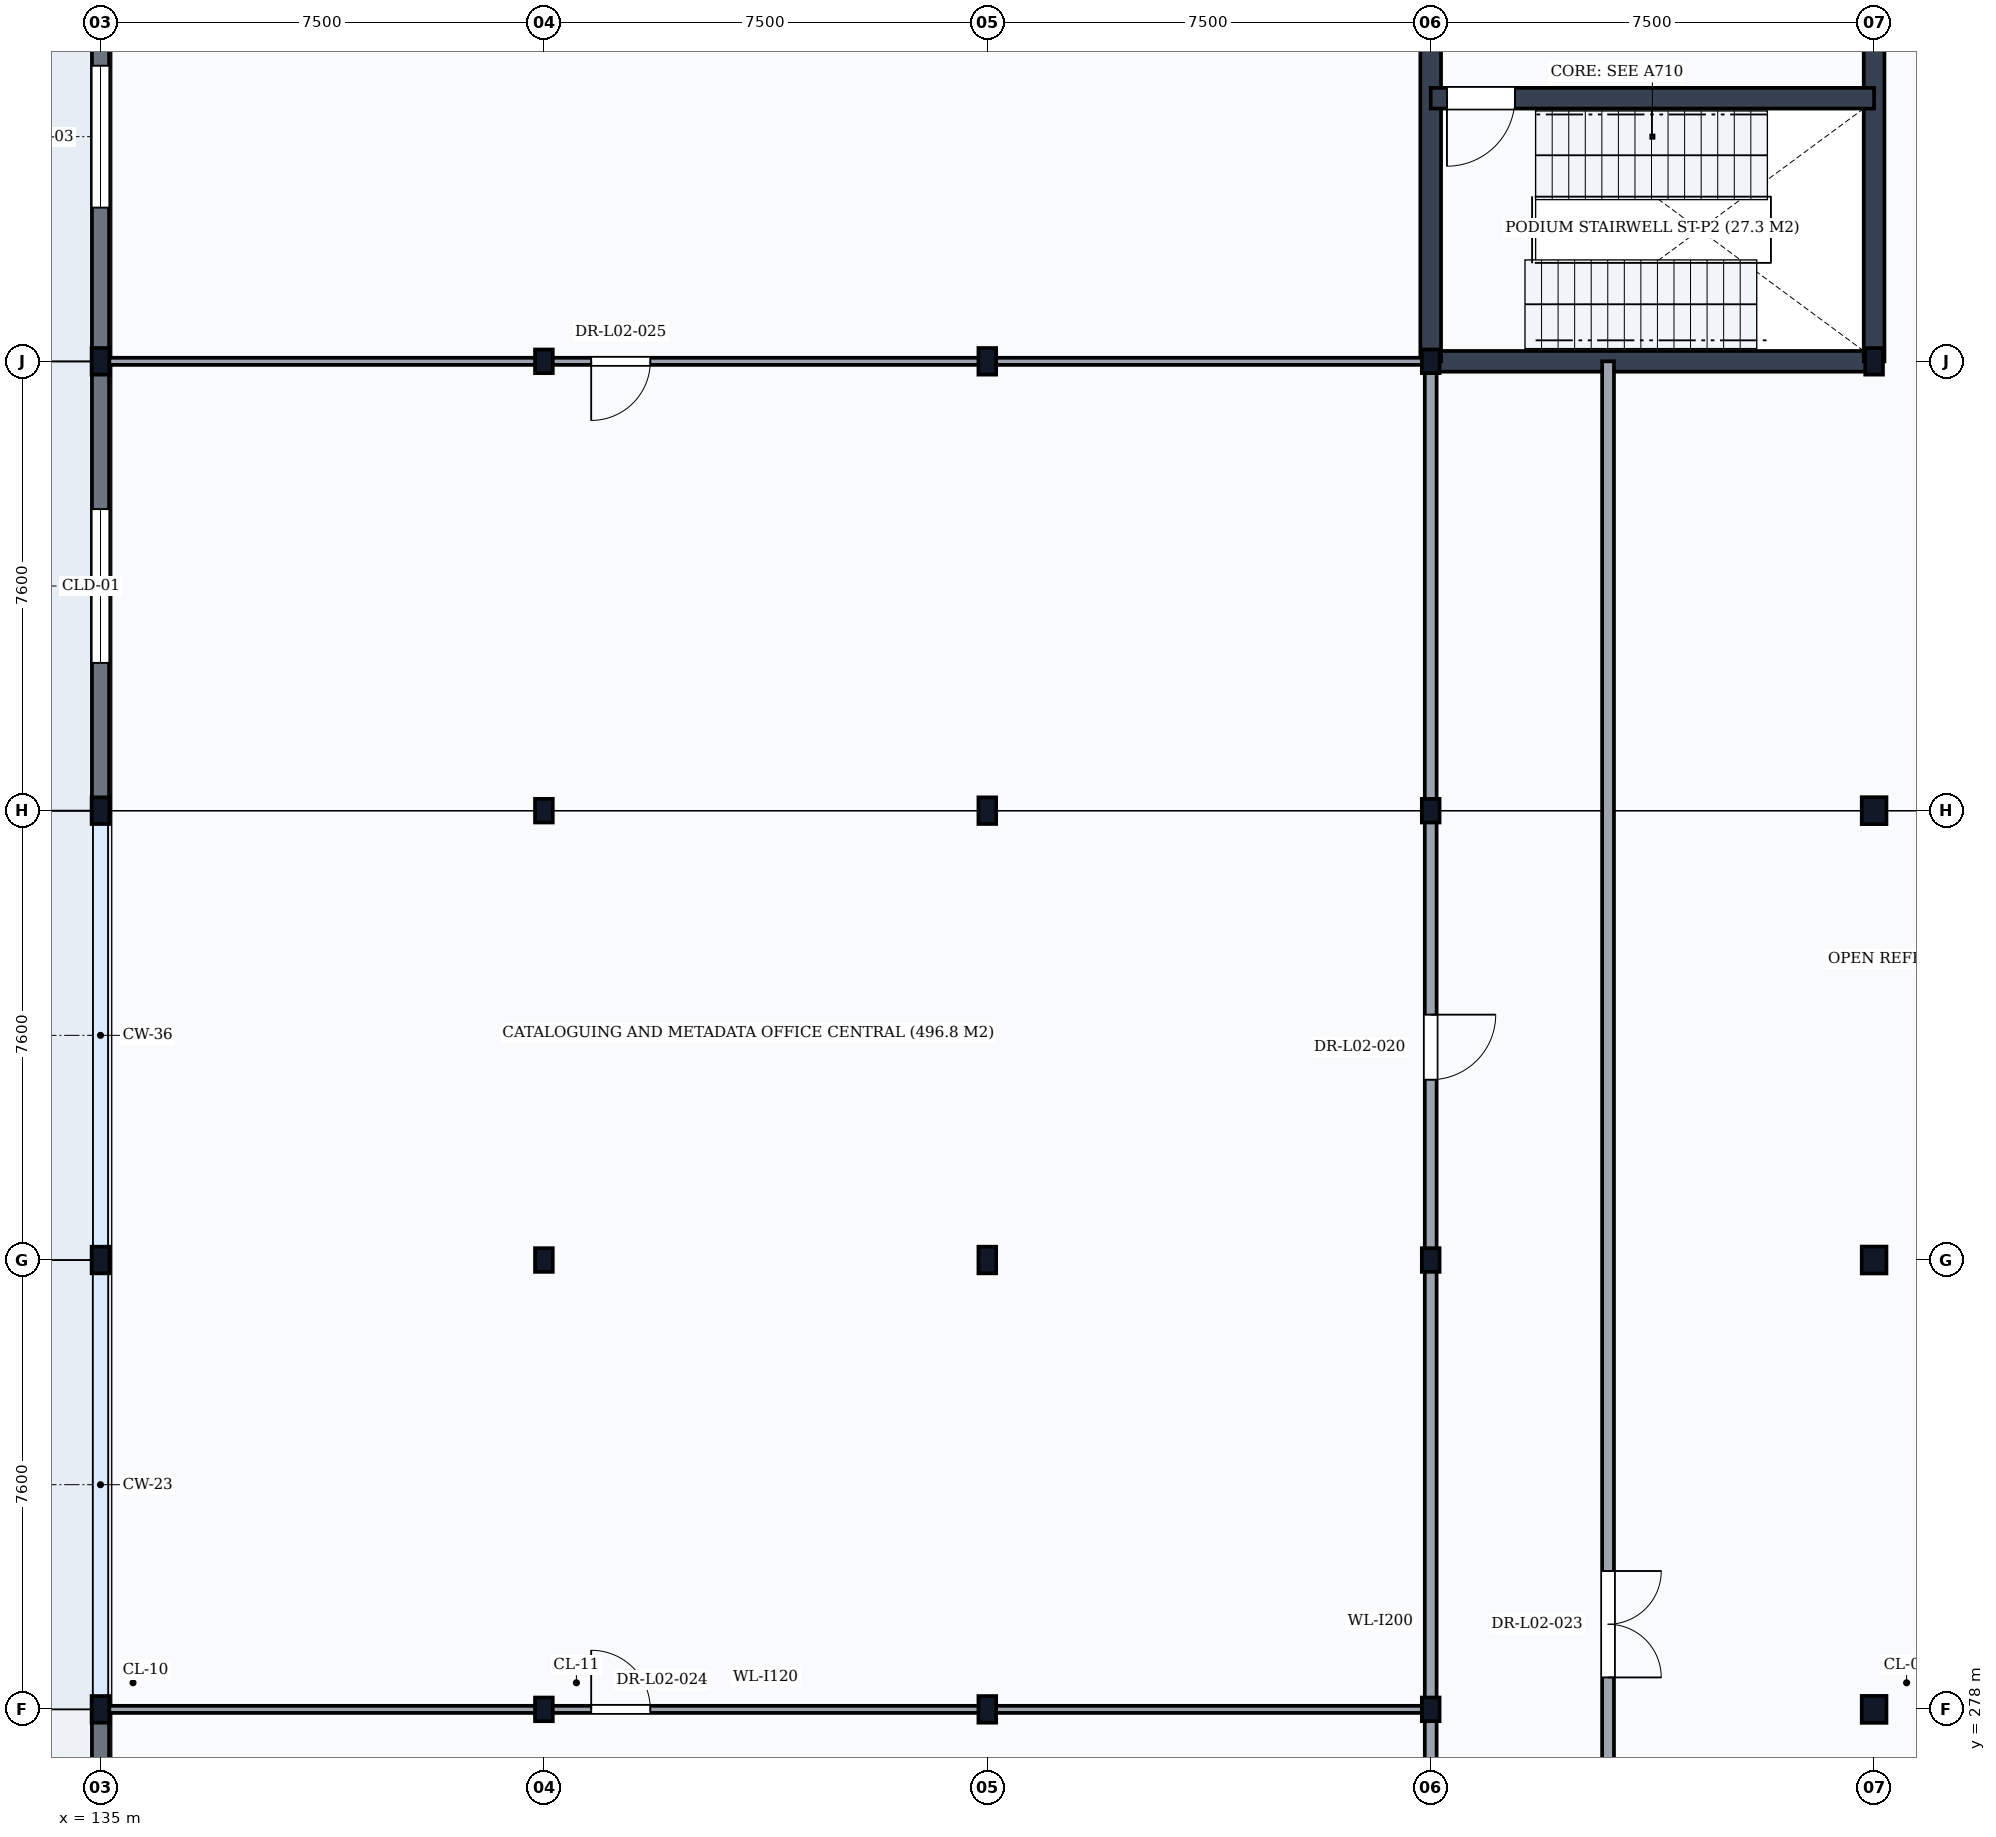
"""IFC4 building model, lengths in metres.
Left out: names, types, materials, properties, quantities, classifications, styles, units other than length and angle.
Written with IfcOpenShell. Run it as: python <this file> out.ifc"""

import sys

from ifc_helpers import new_model, si_unit, direction, frame, frame_2d, origin, origin_2d, place, context, subcontext, project, spatial, rectangle, i_section, extrude, element, fill, save


model = new_model("IFC4")
c1 = context("Model", 3, precision=1e-05, world=origin(), true_north=direction((0.0, 1.0)))
c2 = subcontext(c1, "Body", "Model", "MODEL_VIEW")
j1 = project(units=[si_unit("LENGTHUNIT", "METRE"), si_unit("PLANEANGLEUNIT", "RADIAN")], contexts=[c1])
p1 = place(None, origin())
s1 = spatial("IfcSite", under=j1, at=p1, CompositionType="ELEMENT")
p2 = place(p1, origin())
s2 = spatial("IfcBuilding", under=s1, at=p2, CompositionType="ELEMENT")
p3 = place(p2, frame((0.0, 0.0, 5.4)))
s3 = spatial("IfcBuildingStorey", under=s2, at=p3, CompositionType="ELEMENT", Elevation=5.4)
for number, where, z_axis, x_axis in (
    (1, (135.0, 278.0, 0.0), (0.0, 0.0, 1.0), (1.0, 0.0, 0.0)),
    (2, (135.0, 285.6, 0.0), (0.0, 0.0, 1.0), (1.0, 0.0, 0.0)),
    (3, (135.0, 293.2, 0.0), (0.0, 0.0, 1.0), (1.0, 0.0, 0.0)),
    (4, (135.0, 300.8, 0.0), (0.0, 0.0, 1.0), (1.0, 0.0, 0.0)),
):
    element("IfcColumn", number, at=place(p3, frame(where, z_axis=z_axis, x_axis=x_axis)), inside=s3, PredefinedType="COLUMN", context=c2, shape_type="SweptSolid", body=[
        extrude(i_section(OverallWidth=0.3, OverallDepth=0.45, WebThickness=0.014, FlangeThickness=0.026, FilletRadius=0.027, at=origin_2d()), origin(), (0.0, 0.0, 1.0), 5.1),
    ])
for number, where, z_axis, x_axis in (
    (5, (142.5, 278.0, 0.0), (0.0, 0.0, 1.0), (1.0, 0.0, 0.0)),
    (6, (142.5, 285.6, 0.0), (0.0, 0.0, 1.0), (1.0, 0.0, 0.0)),
    (7, (142.5, 293.2, 0.0), (0.0, 0.0, 1.0), (1.0, 0.0, 0.0)),
    (8, (142.5, 300.8, 0.0), (0.0, 0.0, 1.0), (1.0, 0.0, 0.0)),
):
    element("IfcColumn", number, at=place(p3, frame(where, z_axis=z_axis, x_axis=x_axis)), inside=s3, PredefinedType="COLUMN", context=c2, shape_type="SweptSolid", body=[
        extrude(i_section(OverallWidth=0.3, OverallDepth=0.4, WebThickness=0.013, FlangeThickness=0.024, FilletRadius=0.027, at=origin_2d()), origin(), (0.0, 0.0, 1.0), 5.1),
    ])
for number, where, z_axis, x_axis in (
    (9, (150.0, 278.0, 0.0), (0.0, 0.0, 1.0), (1.0, 0.0, 0.0)),
    (10, (150.0, 285.6, 0.0), (0.0, 0.0, 1.0), (1.0, 0.0, 0.0)),
    (11, (150.0, 293.2, 0.0), (0.0, 0.0, 1.0), (1.0, 0.0, 0.0)),
    (12, (150.0, 300.8, 0.0), (0.0, 0.0, 1.0), (1.0, 0.0, 0.0)),
):
    element("IfcColumn", number, at=place(p3, frame(where, z_axis=z_axis, x_axis=x_axis)), inside=s3, PredefinedType="COLUMN", context=c2, shape_type="SweptSolid", body=[
        extrude(i_section(OverallWidth=0.3, OverallDepth=0.45, WebThickness=0.014, FlangeThickness=0.026, FilletRadius=0.027, at=origin_2d()), origin(), (0.0, 0.0, 1.0), 5.1),
    ])
for number, where, z_axis, x_axis in (
    (13, (157.5, 278.0, 0.0), (0.0, 0.0, 1.0), (1.0, 0.0, 0.0)),
    (14, (157.5, 285.6, 0.0), (0.0, 0.0, 1.0), (1.0, 0.0, 0.0)),
    (15, (157.5, 293.2, 0.0), (0.0, 0.0, 1.0), (1.0, 0.0, 0.0)),
    (16, (157.5, 300.8, 0.0), (0.0, 0.0, 1.0), (1.0, 0.0, 0.0)),
):
    element("IfcColumn", number, at=place(p3, frame(where, z_axis=z_axis, x_axis=x_axis)), inside=s3, PredefinedType="COLUMN", context=c2, shape_type="SweptSolid", body=[
        extrude(i_section(OverallWidth=0.3, OverallDepth=0.4, WebThickness=0.013, FlangeThickness=0.024, FilletRadius=0.027, at=origin_2d()), origin(), (0.0, 0.0, 1.0), 5.1),
    ])
for number, where, z_axis, x_axis in (
    (17, (165.0, 278.0, 0.0), (0.0, 0.0, 1.0), (1.0, 0.0, 0.0)),
    (18, (165.0, 285.6, 0.0), (0.0, 0.0, 1.0), (1.0, 0.0, 0.0)),
    (19, (165.0, 293.2, 0.0), (0.0, 0.0, 1.0), (1.0, 0.0, 0.0)),
):
    element("IfcColumn", number, at=place(p3, frame(where, z_axis=z_axis, x_axis=x_axis)), inside=s3, PredefinedType="COLUMN", context=c2, shape_type="SweptSolid", body=[
        extrude(i_section(OverallWidth=0.418, OverallDepth=0.455, WebThickness=0.042, FlangeThickness=0.068, FilletRadius=0.015, at=origin_2d()), origin(), (0.0, 0.0, 1.0), 5.1),
    ])
p4 = place(p3, frame((165.0, 300.8, 0.0), z_axis=(0.0, 0.0, 1.0), x_axis=(1.0, 0.0, 0.0)))
e20 = element("IfcColumn", 20, at=p4, inside=s3, PredefinedType="COLUMN", context=c2, shape_type="SweptSolid", body=[
    extrude(i_section(OverallWidth=0.3, OverallDepth=0.45, WebThickness=0.014, FlangeThickness=0.026, FilletRadius=0.027, at=origin_2d()), origin(), (0.0, 0.0, 1.0), 5.1),
])
p5 = place(p3, frame((135.0, 270.406, 0.0), z_axis=(0.0, 0.0, 1.0), x_axis=(0.0, 1.0, 0.0)))
e21 = element("IfcWall", 21, at=p5, inside=s3, PredefinedType="SOLIDWALL", context=c2, shape_type="SweptSolid", body=[
    extrude(rectangle(XDim=7.588, YDim=0.29, at=frame_2d((3.794, 0.0))), origin(), (0.0, 0.0, 1.0), 4.578),
])
p6 = place(p5, frame((2.994, 0.0, 0.95)))
e22 = element("IfcOpeningElement", 22, at=p6, cuts=e21, PredefinedType="OPENING", context=c2, shape_type="SweptSolid", body=[
    extrude(rectangle(XDim=1.6, YDim=2.4, at=frame_2d((0.8, 1.2))), frame((0.0, 0.16, 0.0), z_axis=(0.0, -1.0, 0.0), x_axis=(1.0, 0.0, 0.0)), (0.0, 0.0, 1.0), 0.32),
])
p7 = place(p3, frame((135.0, 293.206, 0.0), z_axis=(0.0, 0.0, 1.0), x_axis=(0.0, 1.0, 0.0)))
e23 = element("IfcWall", 23, at=p7, inside=s3, PredefinedType="SOLIDWALL", context=c2, shape_type="SweptSolid", body=[
    extrude(rectangle(XDim=7.588, YDim=0.29, at=frame_2d((3.794, 0.0))), origin(), (0.0, 0.0, 1.0), 4.578),
])
p8 = place(p7, frame((2.494, 0.0, 0.95)))
e24 = element("IfcOpeningElement", 24, at=p8, cuts=e23, PredefinedType="OPENING", context=c2, shape_type="SweptSolid", body=[
    extrude(rectangle(XDim=2.6, YDim=3.0, at=frame_2d((1.3, 1.5))), frame((0.0, 0.16, 0.0), z_axis=(0.0, -1.0, 0.0), x_axis=(1.0, 0.0, 0.0)), (0.0, 0.0, 1.0), 0.32),
])
p9 = place(p3, frame((135.0, 300.806, 0.0), z_axis=(0.0, 0.0, 1.0), x_axis=(0.0, 1.0, 0.0)))
e25 = element("IfcWall", 25, at=p9, inside=s3, PredefinedType="SOLIDWALL", context=c2, shape_type="SweptSolid", body=[
    extrude(rectangle(XDim=7.588, YDim=0.29, at=frame_2d((3.794, 0.0))), origin(), (0.0, 0.0, 1.0), 4.578),
])
p10 = place(p9, frame((2.594, 0.0, 0.95)))
e26 = element("IfcOpeningElement", 26, at=p10, cuts=e25, PredefinedType="OPENING", context=c2, shape_type="SweptSolid", body=[
    extrude(rectangle(XDim=2.4, YDim=2.8, at=frame_2d((1.2, 1.4))), frame((0.0, 0.16, 0.0), z_axis=(0.0, -1.0, 0.0), x_axis=(1.0, 0.0, 0.0)), (0.0, 0.0, 1.0), 0.32),
])
p11 = place(p3, frame((135.1, 248.6, 5.1), z_axis=(0.0, 0.0, 1.0), x_axis=(0.0, 1.0, 0.0)))
e27 = element("IfcWall", 27, at=p11, inside=s3, PredefinedType="PARAPET", context=c2, shape_type="SweptSolid", body=[
    extrude(rectangle(XDim=89.2, YDim=0.18, at=frame_2d((44.6, 0.0))), origin(), (0.0, 0.0, 1.0), 1.2),
])
p12 = place(p3, frame((157.5, 300.8, 0.0), z_axis=(0.0, 0.0, 1.0), x_axis=(1.0, 0.0, 0.0)))
e28 = element("IfcWall", 28, at=p12, inside=s3, PredefinedType="SHEAR", context=c2, shape_type="SweptSolid", body=[
    extrude(rectangle(XDim=7.5, YDim=0.35, at=frame_2d((3.75, 0.0))), origin(), (0.0, 0.0, 1.0), 4.86),
])
for number, where, z_axis, x_axis in (
    (29, (157.5, 300.8, 0.0), (0.0, 0.0, 1.0), (0.0, 1.0, 0.0)),
    (30, (165.0, 300.8, 0.0), (0.0, 0.0, 1.0), (0.0, 1.0, 0.0)),
):
    element("IfcWall", number, at=place(p3, frame(where, z_axis=z_axis, x_axis=x_axis)), inside=s3, PredefinedType="SHEAR", context=c2, shape_type="SweptSolid", body=[
        extrude(rectangle(XDim=7.6, YDim=0.35, at=frame_2d((3.8, 0.0))), origin(), (0.0, 0.0, 1.0), 4.86),
    ])
p13 = place(p3, frame((157.5, 305.25, 0.0), z_axis=(0.0, 0.0, 1.0), x_axis=(1.0, 0.0, 0.0)))
e31 = element("IfcWall", 31, at=p13, inside=s3, PredefinedType="SHEAR", context=c2, shape_type="SweptSolid", body=[
    extrude(rectangle(XDim=7.5, YDim=0.35, at=frame_2d((3.75, 0.0))), origin(), (0.0, 0.0, 1.0), 4.86),
])
p14 = place(p13, frame((0.275, 0.0, 0.0)))
e32 = element("IfcOpeningElement", 32, at=p14, cuts=e31, PredefinedType="OPENING", context=c2, shape_type="SweptSolid", body=[
    extrude(rectangle(XDim=1.15, YDim=2.15, at=frame_2d((0.575, 1.075))), frame((0.0, 0.19, 0.0), z_axis=(0.0, -1.0, 0.0), x_axis=(1.0, 0.0, 0.0)), (0.0, 0.0, 1.0), 0.38),
])
p15 = place(p3, frame((157.5, 258.2, 0.0), z_axis=(0.0, 0.0, 1.0), x_axis=(0.0, 1.0, 0.0)))
e33 = element("IfcWall", 33, at=p15, inside=s3, PredefinedType="PARTITIONING", context=c2, shape_type="SweptSolid", body=[
    extrude(rectangle(XDim=42.6, YDim=0.2, at=frame_2d((21.3, 0.0))), origin(), (0.0, 0.0, 1.0), 4.498),
])
p16 = place(p15, frame((9.45, 0.0, 0.0)))
e34 = element("IfcOpeningElement", 34, at=p16, cuts=e33, PredefinedType="OPENING", context=c2, shape_type="SweptSolid", body=[
    extrude(rectangle(XDim=1.1, YDim=2.1, at=frame_2d((0.55, 1.05))), frame((0.0, 0.115, 0.0), z_axis=(0.0, -1.0, 0.0), x_axis=(1.0, 0.0, 0.0)), (0.0, 0.0, 1.0), 0.23),
])
p17 = place(p15, frame((30.45, 0.0, 0.0)))
e35 = element("IfcOpeningElement", 35, at=p17, cuts=e33, PredefinedType="OPENING", context=c2, shape_type="SweptSolid", body=[
    extrude(rectangle(XDim=1.1, YDim=2.1, at=frame_2d((0.55, 1.05))), frame((0.0, 0.115, 0.0), z_axis=(0.0, -1.0, 0.0), x_axis=(1.0, 0.0, 0.0)), (0.0, 0.0, 1.0), 0.23),
])
p18 = place(p3, frame((160.5, 258.2, 0.0), z_axis=(0.0, 0.0, 1.0), x_axis=(0.0, 1.0, 0.0)))
e36 = element("IfcWall", 36, at=p18, inside=s3, PredefinedType="PARTITIONING", context=c2, shape_type="SweptSolid", body=[
    extrude(rectangle(XDim=42.6, YDim=0.2, at=frame_2d((21.3, 0.0))), origin(), (0.0, 0.0, 1.0), 4.86),
])
p19 = place(p18, frame((20.34, 0.0, 0.0)))
e37 = element("IfcOpeningElement", 37, at=p19, cuts=e36, PredefinedType="OPENING", context=c2, shape_type="SweptSolid", body=[
    extrude(rectangle(XDim=1.8, YDim=2.4, at=frame_2d((0.9, 1.2))), frame((0.0, 0.115, 0.0), z_axis=(0.0, -1.0, 0.0), x_axis=(1.0, 0.0, 0.0)), (0.0, 0.0, 1.0), 0.23),
])
p20 = place(p3, frame((135.0, 278.0, 0.0), z_axis=(0.0, 0.0, 1.0), x_axis=(1.0, 0.0, 0.0)))
e38 = element("IfcWall", 38, at=p20, inside=s3, PredefinedType="PARTITIONING", context=c2, shape_type="SweptSolid", body=[
    extrude(rectangle(XDim=22.5, YDim=0.12, at=frame_2d((11.25, 0.0))), origin(), (0.0, 0.0, 1.0), 4.488),
])
p21 = place(p20, frame((8.3, 0.0, 0.0)))
e39 = element("IfcOpeningElement", 39, at=p21, cuts=e38, PredefinedType="OPENING", context=c2, shape_type="SweptSolid", body=[
    extrude(rectangle(XDim=1.0, YDim=2.1, at=frame_2d((0.5, 1.05))), frame((0.0, 0.075, 0.0), z_axis=(0.0, -1.0, 0.0), x_axis=(1.0, 0.0, 0.0)), (0.0, 0.0, 1.0), 0.15),
])
p22 = place(p3, frame((135.0, 300.8, 0.0), z_axis=(0.0, 0.0, 1.0), x_axis=(1.0, 0.0, 0.0)))
e40 = element("IfcWall", 40, at=p22, inside=s3, PredefinedType="PARTITIONING", context=c2, shape_type="SweptSolid", body=[
    extrude(rectangle(XDim=22.5, YDim=0.12, at=frame_2d((11.25, 0.0))), origin(), (0.0, 0.0, 1.0), 4.488),
])
p23 = place(p22, frame((8.3, 0.0, 0.0)))
e41 = element("IfcOpeningElement", 41, at=p23, cuts=e40, PredefinedType="OPENING", context=c2, shape_type="SweptSolid", body=[
    extrude(rectangle(XDim=1.0, YDim=2.1, at=frame_2d((0.5, 1.05))), frame((0.0, 0.075, 0.0), z_axis=(0.0, -1.0, 0.0), x_axis=(1.0, 0.0, 0.0)), (0.0, 0.0, 1.0), 0.15),
])
p24 = place(p8, origin())
e42 = element("IfcWindow", 42, at=p24, inside=s3, PartitioningType="DOUBLE_PANEL_VERTICAL", PredefinedType="WINDOW", context=c2, shape_type="SweptSolid", body=[
    extrude(rectangle(XDim=2.6, YDim=3.0, at=frame_2d((1.3, 1.5))), frame((0.0, 0.03, 0.0), z_axis=(0.0, -1.0, 0.0), x_axis=(1.0, 0.0, 0.0)), (0.0, 0.0, 1.0), 0.06),
])
fill(e24, e42)
p25 = place(p10, origin())
e43 = element("IfcWindow", 43, at=p25, inside=s3, PartitioningType="DOUBLE_PANEL_VERTICAL", PredefinedType="WINDOW", context=c2, shape_type="SweptSolid", body=[
    extrude(rectangle(XDim=2.4, YDim=2.8, at=frame_2d((1.2, 1.4))), frame((0.0, 0.03, 0.0), z_axis=(0.0, -1.0, 0.0), x_axis=(1.0, 0.0, 0.0)), (0.0, 0.0, 1.0), 0.06),
])
fill(e26, e43)
p26 = place(p14, frame((1.15, 0.0, 0.0), z_axis=(0.0, 0.0, 1.0), x_axis=(-1.0, 0.0, 0.0)))
e44 = element("IfcDoor", 44, at=p26, inside=s3, OperationType="SINGLE_SWING_RIGHT", PredefinedType="DOOR", context=c2, shape_type="SweptSolid", body=[
    extrude(rectangle(XDim=1.15, YDim=2.15, at=frame_2d((0.575, 1.075))), frame((0.0, 0.025, 0.0), z_axis=(0.0, -1.0, 0.0), x_axis=(1.0, 0.0, 0.0)), (0.0, 0.0, 1.0), 0.05),
])
fill(e32, e44)
p27 = place(p17, origin())
e45 = element("IfcDoor", 45, at=p27, inside=s3, OperationType="SINGLE_SWING_RIGHT", PredefinedType="DOOR", context=c2, shape_type="SweptSolid", body=[
    extrude(rectangle(XDim=1.1, YDim=2.1, at=frame_2d((0.55, 1.05))), frame((0.0, 0.025, 0.0), z_axis=(0.0, -1.0, 0.0), x_axis=(1.0, 0.0, 0.0)), (0.0, 0.0, 1.0), 0.05),
])
fill(e35, e45)
p28 = place(p19, frame((1.8, 0.0, 0.0), z_axis=(0.0, 0.0, 1.0), x_axis=(-1.0, 0.0, 0.0)))
e46 = element("IfcDoor", 46, at=p28, inside=s3, OperationType="DOUBLE_DOOR_SINGLE_SWING", PredefinedType="DOOR", context=c2, shape_type="SweptSolid", body=[
    extrude(rectangle(XDim=1.8, YDim=2.4, at=frame_2d((0.9, 1.2))), frame((0.0, 0.025, 0.0), z_axis=(0.0, -1.0, 0.0), x_axis=(1.0, 0.0, 0.0)), (0.0, 0.0, 1.0), 0.05),
])
fill(e37, e46)
p29 = place(p21, origin())
e47 = element("IfcDoor", 47, at=p29, inside=s3, OperationType="SINGLE_SWING_LEFT", PredefinedType="DOOR", context=c2, shape_type="SweptSolid", body=[
    extrude(rectangle(XDim=1.0, YDim=2.1, at=frame_2d((0.5, 1.05))), frame((0.0, 0.025, 0.0), z_axis=(0.0, -1.0, 0.0), x_axis=(1.0, 0.0, 0.0)), (0.0, 0.0, 1.0), 0.05),
])
fill(e39, e47)
p30 = place(p23, frame((1.0, 0.0, 0.0), z_axis=(0.0, 0.0, 1.0), x_axis=(-1.0, 0.0, 0.0)))
e48 = element("IfcDoor", 48, at=p30, inside=s3, OperationType="SINGLE_SWING_RIGHT", PredefinedType="DOOR", context=c2, shape_type="SweptSolid", body=[
    extrude(rectangle(XDim=1.0, YDim=2.1, at=frame_2d((0.5, 1.05))), frame((0.0, 0.025, 0.0), z_axis=(0.0, -1.0, 0.0), x_axis=(1.0, 0.0, 0.0)), (0.0, 0.0, 1.0), 0.05),
])
fill(e41, e48)
save(model, sys.argv[1])
